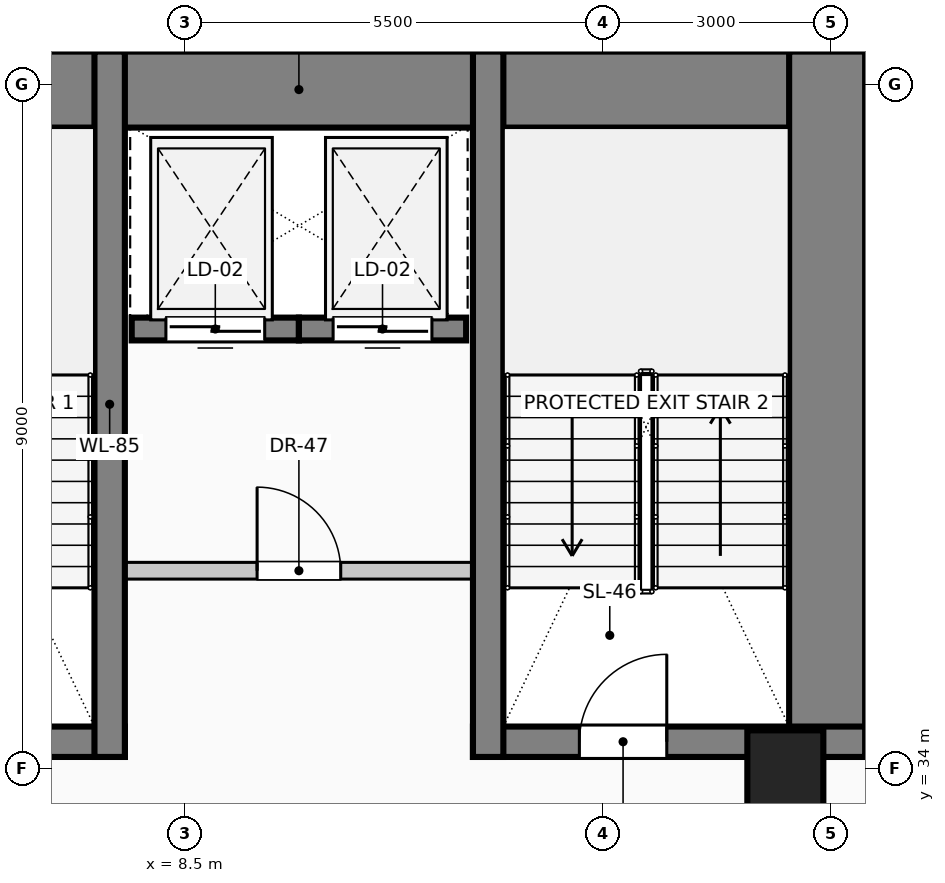
"""IFC4 building model, lengths in metres.
Left out: names, types, materials, properties, quantities, classifications, styles, units other than length and angle.
Written with IfcOpenShell. Run it as: python <this file> out.ifc"""

import sys

from ifc_helpers import new_model, si_unit, direction, frame, frame_2d, origin, origin_2d, place, context, subcontext, project, spatial, rectangle, circle, extrude, element, fill, save


model = new_model("IFC4")
c1 = context("Model", 3, precision=1e-05, world=origin(), true_north=direction((0.0, 1.0)))
c2 = subcontext(c1, "Body", "Model", "MODEL_VIEW")
j1 = project(units=[si_unit("LENGTHUNIT", "METRE"), si_unit("PLANEANGLEUNIT", "RADIAN")], contexts=[c1])
p1 = place(None, origin())
s1 = spatial("IfcSite", under=j1, at=p1, CompositionType="ELEMENT")
p2 = place(p1, origin())
s2 = spatial("IfcBuilding", under=s1, at=p2, CompositionType="ELEMENT")
p3 = place(p2, frame((0.0, 0.0, 58.6)))
s3 = spatial("IfcBuildingStorey", under=s2, at=p3, CompositionType="ELEMENT", Elevation=58.6)
p4 = place(p3, frame((2.55, 42.93, 0.0), z_axis=(0.0, 0.0, 1.0), x_axis=(1.0, 0.0, 0.0)))
e1 = element("IfcWall", 1, at=p4, inside=s3, PredefinedType="SHEAR", context=c2, shape_type="SweptSolid", body=[
    extrude(rectangle(XDim=14.9, YDim=1.0, at=frame_2d((7.45, 0.0))), origin(), (0.0, 0.0, 1.0), 4.0),
])
p5 = place(p3, frame((16.95, 34.15, 0.0), z_axis=(0.0, 0.0, 1.0), x_axis=(0.0, 1.0, 0.0)))
e2 = element("IfcWall", 2, at=p5, inside=s3, PredefinedType="SHEAR", context=c2, shape_type="SweptSolid", body=[
    extrude(rectangle(XDim=9.28, YDim=1.0, at=frame_2d((4.64, 0.0))), origin(), (0.0, 0.0, 1.0), 4.0),
])
p6 = place(p3, frame((2.55, 34.35, 0.0), z_axis=(0.0, 0.0, 1.0), x_axis=(1.0, 0.0, 0.0)))
e3 = element("IfcWall", 3, at=p6, inside=s3, PredefinedType="SHEAR", context=c2, shape_type="SweptSolid", body=[
    extrude(rectangle(XDim=5.16, YDim=0.4, at=frame_2d((2.58, 0.0))), origin(), (0.0, 0.0, 1.0), 4.0),
])
p7 = place(p6, frame((2.4, 0.0, 0.0)))
e4 = element("IfcOpeningElement", 4, at=p7, cuts=e3, PredefinedType="OPENING", context=c2, shape_type="SweptSolid", body=[
    extrude(rectangle(XDim=1.15, YDim=2.2, at=frame_2d((0.575, 1.1))), frame((0.0, 0.21, 0.0), z_axis=(0.0, -1.0, 0.0), x_axis=(1.0, 0.0, 0.0)), (0.0, 0.0, 1.0), 0.42),
])
p8 = place(p3, frame((12.29, 34.35, 0.0), z_axis=(0.0, 0.0, 1.0), x_axis=(1.0, 0.0, 0.0)))
e5 = element("IfcWall", 5, at=p8, inside=s3, PredefinedType="SHEAR", context=c2, shape_type="SweptSolid", body=[
    extrude(rectangle(XDim=5.16, YDim=0.4, at=frame_2d((2.58, 0.0))), origin(), (0.0, 0.0, 1.0), 4.0),
])
p9 = place(p8, frame((1.4, 0.0, 0.0)))
e6 = element("IfcOpeningElement", 6, at=p9, cuts=e5, PredefinedType="OPENING", context=c2, shape_type="SweptSolid", body=[
    extrude(rectangle(XDim=1.15, YDim=2.2, at=frame_2d((0.575, 1.1))), frame((0.0, 0.21, 0.0), z_axis=(0.0, -1.0, 0.0), x_axis=(1.0, 0.0, 0.0)), (0.0, 0.0, 1.0), 0.42),
])
for number, where, z_axis, x_axis in (
    (7, (7.51, 34.15, 0.0), (0.0, 0.0, 1.0), (0.0, 1.0, 0.0)),
    (8, (12.49, 34.15, 0.0), (0.0, 0.0, 1.0), (0.0, 1.0, 0.0)),
):
    element("IfcWall", number, at=place(p3, frame(where, z_axis=z_axis, x_axis=x_axis)), inside=s3, PredefinedType="SHEAR", context=c2, shape_type="SweptSolid", body=[
        extrude(rectangle(XDim=9.28, YDim=0.4, at=frame_2d((4.64, 0.0))), origin(), (0.0, 0.0, 1.0), 4.0),
    ])
p10 = place(p3, frame((16.4, 34.0, 0.0), z_axis=(0.0, 0.0, 1.0), x_axis=(1.0, 0.0, 0.0)))
e9 = element("IfcColumn", 9, at=p10, inside=s3, PredefinedType="COLUMN", context=c2, shape_type="SweptSolid", body=[
    extrude(circle(Radius=0.5, at=origin_2d()), origin(), (0.0, 0.0, 1.0), 4.0),
])
p11 = place(p3, frame((10.0, 39.78, 0.0), z_axis=(0.0, 0.0, 1.0), x_axis=(-1.0, 0.0, 0.0)))
e10 = element("IfcWall", 10, at=p11, inside=s3, PredefinedType="SOLIDWALL", context=c2, shape_type="SweptSolid", body=[
    extrude(rectangle(XDim=2.2, YDim=0.3, at=frame_2d((1.1, 0.0))), origin(), (0.0, 0.0, 1.0), 4.0),
])
p12 = place(p11, frame((0.45, 0.0, 0.0)))
e11 = element("IfcOpeningElement", 11, at=p12, cuts=e10, PredefinedType="OPENING", context=c2, shape_type="SweptSolid", body=[
    extrude(rectangle(XDim=1.3, YDim=2.25, at=frame_2d((0.65, 1.125))), frame((0.0, 0.16, 0.0), z_axis=(0.0, -1.0, 0.0), x_axis=(1.0, 0.0, 0.0)), (0.0, 0.0, 1.0), 0.32),
])
p13 = place(p3, frame((12.2, 39.78, 0.0), z_axis=(0.0, 0.0, 1.0), x_axis=(-1.0, 0.0, 0.0)))
e12 = element("IfcWall", 12, at=p13, inside=s3, PredefinedType="SOLIDWALL", context=c2, shape_type="SweptSolid", body=[
    extrude(rectangle(XDim=2.2, YDim=0.3, at=frame_2d((1.1, 0.0))), origin(), (0.0, 0.0, 1.0), 4.0),
])
p14 = place(p13, frame((0.45, 0.0, 0.0)))
e13 = element("IfcOpeningElement", 13, at=p14, cuts=e12, PredefinedType="OPENING", context=c2, shape_type="SweptSolid", body=[
    extrude(rectangle(XDim=1.3, YDim=2.25, at=frame_2d((0.65, 1.125))), frame((0.0, 0.16, 0.0), z_axis=(0.0, -1.0, 0.0), x_axis=(1.0, 0.0, 0.0)), (0.0, 0.0, 1.0), 0.32),
])
p15 = place(p3, frame((7.51, 36.6, 0.0), z_axis=(0.0, 0.0, 1.0), x_axis=(1.0, 0.0, 0.0)))
e14 = element("IfcWall", 14, at=p15, inside=s3, PredefinedType="PARTITIONING", context=c2, shape_type="SweptSolid", body=[
    extrude(rectangle(XDim=4.98, YDim=0.22, at=frame_2d((2.49, 0.0))), origin(), (0.0, 0.0, 1.0), 3.7),
])
p16 = place(p15, frame((1.94, 0.0, 0.0)))
e15 = element("IfcOpeningElement", 15, at=p16, cuts=e14, PredefinedType="OPENING", context=c2, shape_type="SweptSolid", body=[
    extrude(rectangle(XDim=1.1, YDim=2.2, at=frame_2d((0.55, 1.1))), frame((0.0, 0.12, 0.0), z_axis=(0.0, -1.0, 0.0), x_axis=(1.0, 0.0, 0.0)), (0.0, 0.0, 1.0), 0.24),
])
p17 = place(p12, origin())
e16 = element("IfcDoor", 16, at=p17, inside=s3, OperationType="SLIDING_TO_LEFT", PredefinedType="DOOR", context=c2, shape_type="SweptSolid", body=[
    extrude(rectangle(XDim=1.3, YDim=2.25, at=frame_2d((0.65, 1.125))), frame((0.0, 0.025, 0.0), z_axis=(0.0, -1.0, 0.0), x_axis=(1.0, 0.0, 0.0)), (0.0, 0.0, 1.0), 0.05),
])
fill(e11, e16)
p18 = place(p14, origin())
e17 = element("IfcDoor", 17, at=p18, inside=s3, OperationType="SLIDING_TO_RIGHT", PredefinedType="DOOR", context=c2, shape_type="SweptSolid", body=[
    extrude(rectangle(XDim=1.3, YDim=2.25, at=frame_2d((0.65, 1.125))), frame((0.0, 0.025, 0.0), z_axis=(0.0, -1.0, 0.0), x_axis=(1.0, 0.0, 0.0)), (0.0, 0.0, 1.0), 0.05),
])
fill(e13, e17)
p19 = place(p9, origin())
e18 = element("IfcDoor", 18, at=p19, inside=s3, OperationType="SINGLE_SWING_RIGHT", PredefinedType="DOOR", context=c2, shape_type="SweptSolid", body=[
    extrude(rectangle(XDim=1.15, YDim=2.2, at=frame_2d((0.575, 1.1))), frame((0.0, 0.025, 0.0), z_axis=(0.0, -1.0, 0.0), x_axis=(1.0, 0.0, 0.0)), (0.0, 0.0, 1.0), 0.05),
])
fill(e6, e18)
p20 = place(p16, origin())
e19 = element("IfcDoor", 19, at=p20, inside=s3, OperationType="SINGLE_SWING_LEFT", PredefinedType="DOOR", context=c2, shape_type="SweptSolid", body=[
    extrude(rectangle(XDim=1.1, YDim=2.2, at=frame_2d((0.55, 1.1))), frame((0.0, 0.025, 0.0), z_axis=(0.0, -1.0, 0.0), x_axis=(1.0, 0.0, 0.0)), (0.0, 0.0, 1.0), 0.05),
])
fill(e15, e19)
save(model, sys.argv[1])
